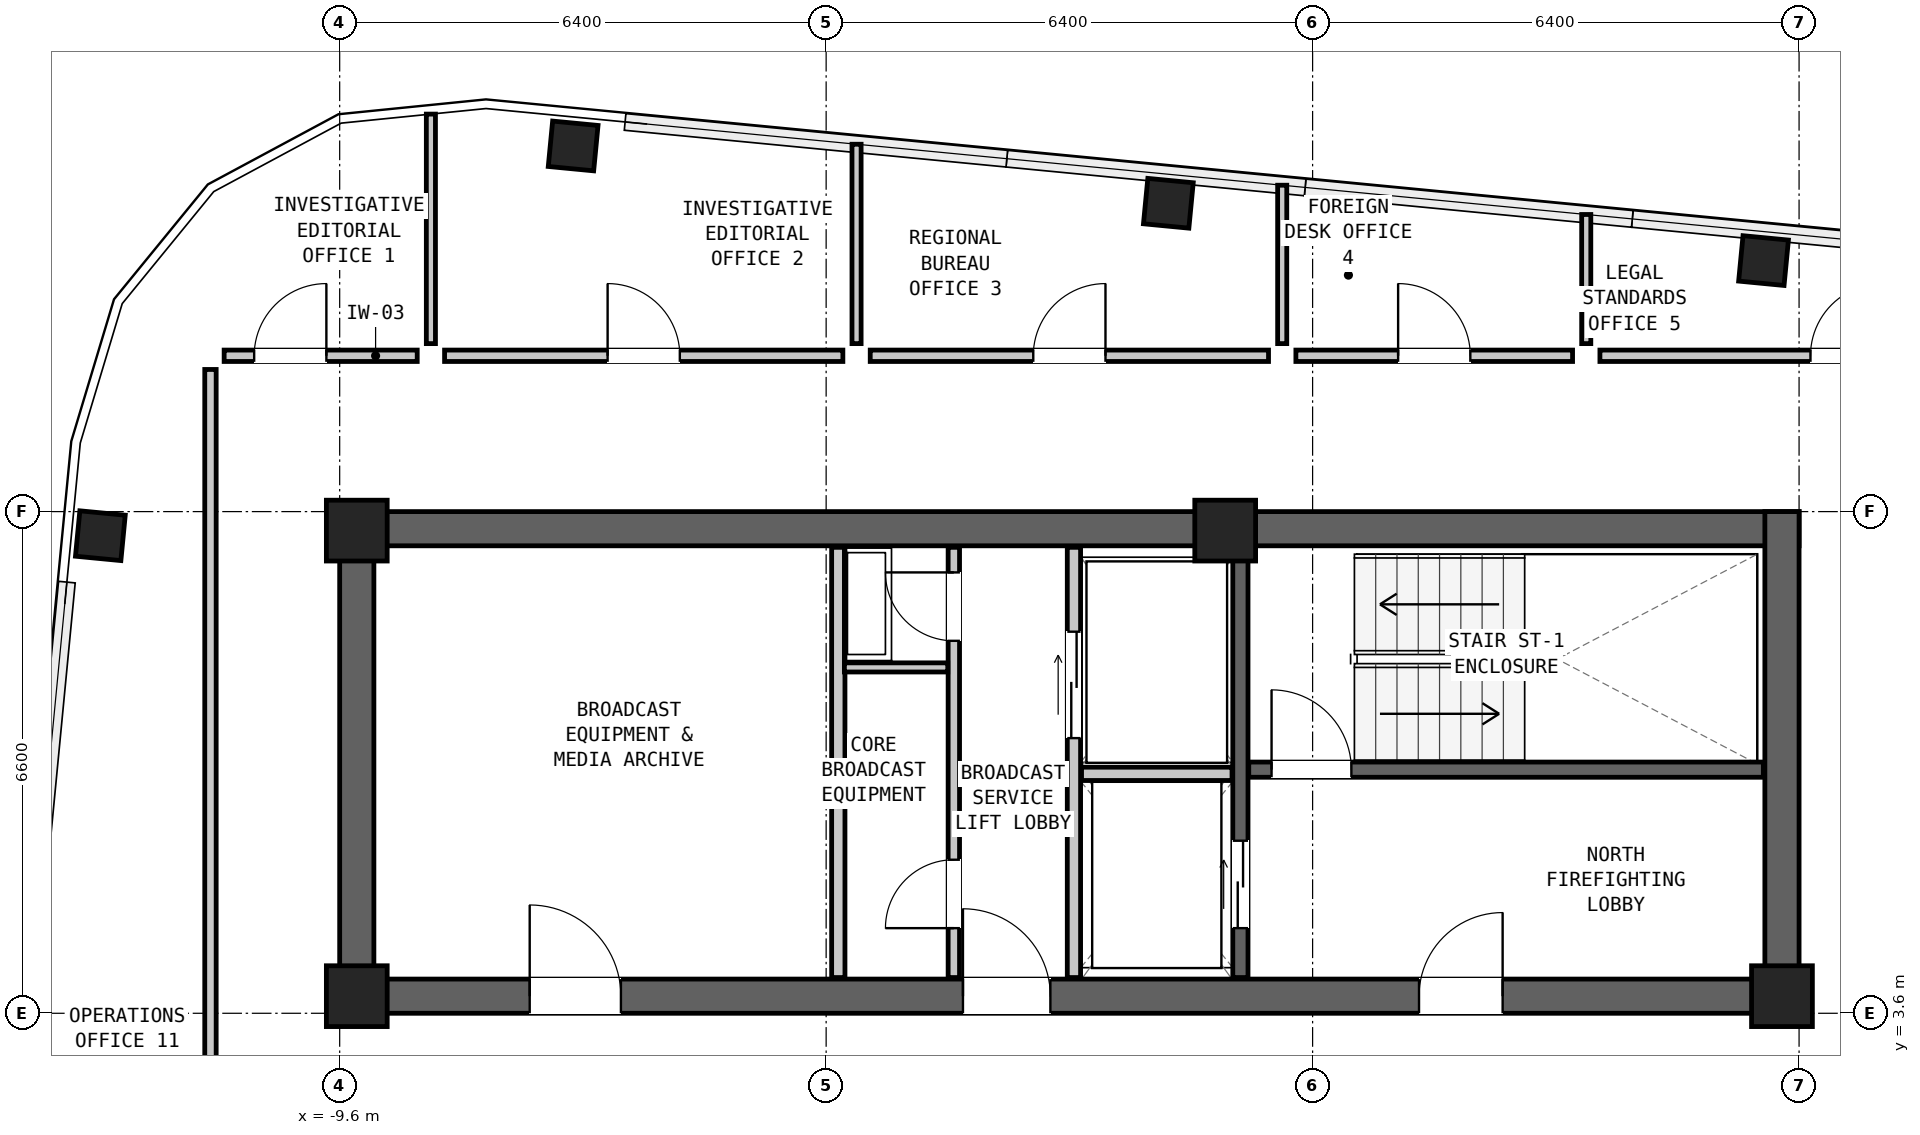
"""IFC4 building model, lengths in metres.
Left out: names, types, materials, properties, quantities, classifications, styles, units other than length and angle.
Written with IfcOpenShell. Run it as: python <this file> out.ifc"""

import sys

from ifc_helpers import new_model, si_unit, direction, frame, frame_2d, origin, origin_2d, place, context, subcontext, project, spatial, rectangle, hollow_rectangle, extrude, element, fill, save


model = new_model("IFC4")
c1 = context("Model", 3, precision=1e-05, world=origin(), true_north=direction((0.0, 1.0)))
c2 = subcontext(c1, "Body", "Model", "MODEL_VIEW")
j1 = project(units=[si_unit("LENGTHUNIT", "METRE"), si_unit("PLANEANGLEUNIT", "RADIAN")], contexts=[c1])
p1 = place(None, origin())
s1 = spatial("IfcSite", under=j1, at=p1, CompositionType="ELEMENT")
p2 = place(p1, origin())
s2 = spatial("IfcBuilding", under=s1, at=p2, CompositionType="ELEMENT")
p3 = place(p2, frame((0.0, 0.0, 252.0)))
s3 = spatial("IfcBuildingStorey", under=s2, at=p3, CompositionType="ELEMENT", Elevation=252.0)
p4 = place(p3, frame((-9.6, 9.975, 0.0), z_axis=(0.0, 0.0, 1.0), x_axis=(1.0, 0.0, 0.0)))
e1 = element("IfcWall", 1, at=p4, inside=s3, PredefinedType="SHEAR", context=c2, shape_type="SweptSolid", body=[
    extrude(rectangle(XDim=19.2, YDim=0.45, at=frame_2d((9.6, 0.0))), origin(), (0.0, 0.0, 1.0), 3.05),
])
p5 = place(p3, frame((-9.6, 3.825, 0.0), z_axis=(0.0, 0.0, 1.0), x_axis=(1.0, 0.0, 0.0)))
e2 = element("IfcWall", 2, at=p5, inside=s3, PredefinedType="SHEAR", context=c2, shape_type="SweptSolid", body=[
    extrude(rectangle(XDim=19.2, YDim=0.45, at=frame_2d((9.6, 0.0))), origin(), (0.0, 0.0, 1.0), 3.05),
])
p6 = place(p5, frame((14.2, 0.0, 0.0)))
e3 = element("IfcOpeningElement", 3, at=p6, cuts=e2, PredefinedType="OPENING", context=c2, shape_type="SweptSolid", body=[
    extrude(rectangle(XDim=1.1, YDim=2.08, at=frame_2d((0.55, 1.04))), frame((0.0, 0.237, 0.0), z_axis=(0.0, -1.0, 0.0), x_axis=(1.0, 0.0, 0.0)), (0.0, 0.0, 1.0), 0.474),
])
p7 = place(p5, frame((8.2, 0.0, 0.0)))
e4 = element("IfcOpeningElement", 4, at=p7, cuts=e2, PredefinedType="OPENING", context=c2, shape_type="SweptSolid", body=[
    extrude(rectangle(XDim=1.15, YDim=2.1, at=frame_2d((0.575, 1.05))), frame((0.0, 0.237, 0.0), z_axis=(0.0, -1.0, 0.0), x_axis=(1.0, 0.0, 0.0)), (0.0, 0.0, 1.0), 0.474),
])
p8 = place(p5, frame((2.5, 0.0, 0.0)))
e5 = element("IfcOpeningElement", 5, at=p8, cuts=e2, PredefinedType="OPENING", context=c2, shape_type="SweptSolid", body=[
    extrude(rectangle(XDim=1.2, YDim=2.1, at=frame_2d((0.6, 1.05))), frame((0.0, 0.237, 0.0), z_axis=(0.0, -1.0, 0.0), x_axis=(1.0, 0.0, 0.0)), (0.0, 0.0, 1.0), 0.474),
])
for number, where, z_axis, x_axis in (
    (6, (-9.375, 3.6, 0.0), (0.0, 0.0, 1.0), (0.0, 1.0, 0.0)),
    (7, (9.375, 3.6, 0.0), (0.0, 0.0, 1.0), (0.0, 1.0, 0.0)),
):
    element("IfcWall", number, at=place(p3, frame(where, z_axis=z_axis, x_axis=x_axis)), inside=s3, PredefinedType="SHEAR", context=c2, shape_type="SweptSolid", body=[
        extrude(rectangle(XDim=6.6, YDim=0.45, at=frame_2d((3.3, 0.0))), origin(), (0.0, 0.0, 1.0), 3.05),
    ])
for number, where, z_axis, x_axis in (
    (8, (9.133, 13.502, 0.0), (0.0, 0.0, 1.0), (0.995, -0.096, 0.0)),
    (9, (1.302, 14.256, 0.0), (0.0, 0.0, 1.0), (0.995, -0.096, 0.0)),
    (10, (-6.528, 15.01, 0.0), (0.0, 0.0, 1.0), (0.995, -0.096, 0.0)),
    (11, (-12.749, 9.883, 0.0), (0.0, 0.0, 1.0), (0.096, 0.995, 0.0)),
):
    element("IfcColumn", number, at=place(p3, frame(where, z_axis=z_axis, x_axis=x_axis)), inside=s3, PredefinedType="COLUMN", context=c2, shape_type="SweptSolid", body=[
        extrude(hollow_rectangle(XDim=0.6, YDim=0.6, WallThickness=0.04, at=origin_2d()), origin(), (0.0, 0.0, 1.0), 3.05),
    ])
for number, where, z_axis, x_axis in (
    (12, (-9.375, 9.95, 0.0), (0.0, 0.0, 1.0), (1.0, 0.0, 0.0)),
    (13, (2.05, 9.95, 0.0), (0.0, 0.0, 1.0), (1.0, 0.0, 0.0)),
    (14, (-9.375, 3.825, 0.0), (0.0, 0.0, 1.0), (1.0, 0.0, 0.0)),
    (15, (9.375, 3.825, 0.0), (0.0, 0.0, 1.0), (1.0, 0.0, 0.0)),
):
    element("IfcColumn", number, at=place(p3, frame(where, z_axis=z_axis, x_axis=x_axis)), inside=s3, PredefinedType="COLUMN", context=c2, shape_type="SweptSolid", body=[
        extrude(rectangle(XDim=0.8, YDim=0.8, at=origin_2d()), origin(), (0.0, 0.0, 1.0), 3.05),
    ])
p9 = place(p3, frame((2.36, 6.805, 0.0), z_axis=(0.0, 0.0, 1.0), x_axis=(1.0, 0.0, 0.0)))
e16 = element("IfcWall", 16, at=p9, inside=s3, PredefinedType="SHEAR", context=c2, shape_type="SweptSolid", body=[
    extrude(rectangle(XDim=6.77, YDim=0.2, at=frame_2d((3.385, 0.0))), origin(), (0.0, 0.0, 1.0), 2.86),
])
p10 = place(p9, frame((0.3, 0.0, 0.0)))
e17 = element("IfcOpeningElement", 17, at=p10, cuts=e16, PredefinedType="OPENING", context=c2, shape_type="SweptSolid", body=[
    extrude(rectangle(XDim=1.05, YDim=2.08, at=frame_2d((0.525, 1.04))), frame((0.0, 0.112, 0.0), z_axis=(0.0, -1.0, 0.0), x_axis=(1.0, 0.0, 0.0)), (0.0, 0.0, 1.0), 0.224),
])
p11 = place(p3, frame((2.25, 4.07, 0.0), z_axis=(0.0, 0.0, 1.0), x_axis=(0.0, 1.0, 0.0)))
e18 = element("IfcWall", 18, at=p11, inside=s3, PredefinedType="SHEAR", context=c2, shape_type="SweptSolid", body=[
    extrude(rectangle(XDim=5.66, YDim=0.2, at=frame_2d((2.83, 0.0))), origin(), (0.0, 0.0, 1.0), 2.86),
])
p12 = place(p11, frame((0.65, 0.0, 0.0)))
e19 = element("IfcOpeningElement", 19, at=p12, cuts=e18, PredefinedType="OPENING", context=c2, shape_type="SweptSolid", body=[
    extrude(rectangle(XDim=1.15, YDim=2.08, at=frame_2d((0.575, 1.04))), frame((0.0, 0.112, 0.0), z_axis=(0.0, -1.0, 0.0), x_axis=(1.0, 0.0, 0.0)), (0.0, 0.0, 1.0), 0.224),
])
p13 = place(p3, frame((0.06, 4.07, 0.0), z_axis=(0.0, 0.0, 1.0), x_axis=(0.0, 1.0, 0.0)))
e20 = element("IfcWall", 20, at=p13, inside=s3, PredefinedType="PARTITIONING", context=c2, shape_type="SweptSolid", body=[
    extrude(rectangle(XDim=5.66, YDim=0.175, at=frame_2d((2.83, 0.0))), origin(), (0.0, 0.0, 1.0), 2.86),
])
p14 = place(p13, frame((3.15, 0.0, 0.0)))
e21 = element("IfcOpeningElement", 21, at=p14, cuts=e20, PredefinedType="OPENING", context=c2, shape_type="SweptSolid", body=[
    extrude(rectangle(XDim=1.4, YDim=2.12, at=frame_2d((0.7, 1.06))), frame((0.0, 0.1, 0.0), z_axis=(0.0, -1.0, 0.0), x_axis=(1.0, 0.0, 0.0)), (0.0, 0.0, 1.0), 0.199),
])
p15 = place(p3, frame((0.16, 6.75, 0.0), z_axis=(0.0, 0.0, 1.0), x_axis=(1.0, 0.0, 0.0)))
e22 = element("IfcWall", 22, at=p15, inside=s3, PredefinedType="PARTITIONING", context=c2, shape_type="SweptSolid", body=[
    extrude(rectangle(XDim=1.98, YDim=0.175, at=frame_2d((0.99, 0.0))), origin(), (0.0, 0.0, 1.0), 2.86),
])
p16 = place(p3, frame((-3.04, 4.07, 0.0), z_axis=(0.0, 0.0, 1.0), x_axis=(0.0, 1.0, 0.0)))
e23 = element("IfcWall", 23, at=p16, inside=s3, PredefinedType="PARTITIONING", context=c2, shape_type="SweptSolid", body=[
    extrude(rectangle(XDim=5.66, YDim=0.175, at=frame_2d((2.83, 0.0))), origin(), (0.0, 0.0, 1.0), 2.86),
])
p17 = place(p3, frame((-1.52, 4.07, 0.0), z_axis=(0.0, 0.0, 1.0), x_axis=(0.0, 1.0, 0.0)))
e24 = element("IfcWall", 24, at=p17, inside=s3, PredefinedType="PARTITIONING", context=c2, shape_type="SweptSolid", body=[
    extrude(rectangle(XDim=5.66, YDim=0.15, at=frame_2d((2.83, 0.0))), origin(), (0.0, 0.0, 1.0), 2.86),
])
p18 = place(p17, frame((4.43, 0.0, 0.0)))
e25 = element("IfcOpeningElement", 25, at=p18, cuts=e24, PredefinedType="OPENING", context=c2, shape_type="SweptSolid", body=[
    extrude(rectangle(XDim=0.9, YDim=2.05, at=frame_2d((0.45, 1.025))), frame((0.0, 0.087, 0.0), z_axis=(0.0, -1.0, 0.0), x_axis=(1.0, 0.0, 0.0)), (0.0, 0.0, 1.0), 0.174),
])
p19 = place(p17, frame((0.65, 0.0, 0.0)))
e26 = element("IfcOpeningElement", 26, at=p19, cuts=e24, PredefinedType="OPENING", context=c2, shape_type="SweptSolid", body=[
    extrude(rectangle(XDim=0.9, YDim=2.05, at=frame_2d((0.45, 1.025))), frame((0.0, 0.087, 0.0), z_axis=(0.0, -1.0, 0.0), x_axis=(1.0, 0.0, 0.0)), (0.0, 0.0, 1.0), 0.174),
])
p20 = place(p3, frame((-2.96, 8.15, 0.0), z_axis=(0.0, 0.0, 1.0), x_axis=(1.0, 0.0, 0.0)))
e27 = element("IfcWall", 27, at=p20, inside=s3, PredefinedType="PARTITIONING", context=c2, shape_type="SweptSolid", body=[
    extrude(rectangle(XDim=1.36, YDim=0.12, at=frame_2d((0.68, 0.0))), origin(), (0.0, 0.0, 1.0), 2.86),
])
p21 = place(p3, frame((-8.4, 12.41, 0.0), z_axis=(0.0, 0.0, 1.0), x_axis=(0.0, 1.0, 0.0)))
e28 = element("IfcWall", 28, at=p21, inside=s3, PredefinedType="PARTITIONING", context=c2, shape_type="SweptSolid", body=[
    extrude(rectangle(XDim=3.02, YDim=0.12, at=frame_2d((1.51, 0.0))), origin(), (0.0, 0.0, 1.0), 2.86),
])
p22 = place(p3, frame((-2.8, 12.41, 0.0), z_axis=(0.0, 0.0, 1.0), x_axis=(0.0, 1.0, 0.0)))
e29 = element("IfcWall", 29, at=p22, inside=s3, PredefinedType="PARTITIONING", context=c2, shape_type="SweptSolid", body=[
    extrude(rectangle(XDim=2.623, YDim=0.12, at=frame_2d((1.312, 0.0))), origin(), (0.0, 0.0, 1.0), 2.381),
])
p23 = place(p3, frame((2.8, 12.41, 0.0), z_axis=(0.0, 0.0, 1.0), x_axis=(0.0, 1.0, 0.0)))
e30 = element("IfcWall", 30, at=p23, inside=s3, PredefinedType="PARTITIONING", context=c2, shape_type="SweptSolid", body=[
    extrude(rectangle(XDim=2.084, YDim=0.12, at=frame_2d((1.042, 0.0))), origin(), (0.0, 0.0, 1.0), 2.381),
])
p24 = place(p3, frame((6.8, 12.41, 0.0), z_axis=(0.0, 0.0, 1.0), x_axis=(0.0, 1.0, 0.0)))
e31 = element("IfcWall", 31, at=p24, inside=s3, PredefinedType="PARTITIONING", context=c2, shape_type="SweptSolid", body=[
    extrude(rectangle(XDim=1.699, YDim=0.12, at=frame_2d((0.85, 0.0))), origin(), (0.0, 0.0, 1.0), 2.86),
])
p25 = place(p3, frame((-11.12, 12.25, 0.0), z_axis=(0.0, 0.0, 1.0), x_axis=(1.0, 0.0, 0.0)))
e32 = element("IfcWall", 32, at=p25, inside=s3, PredefinedType="PARTITIONING", context=c2, shape_type="SweptSolid", body=[
    extrude(rectangle(XDim=2.54, YDim=0.15, at=frame_2d((1.27, 0.0))), origin(), (0.0, 0.0, 1.0), 2.86),
])
p26 = place(p25, frame((0.395, 0.0, 0.0)))
e33 = element("IfcOpeningElement", 33, at=p26, cuts=e32, PredefinedType="OPENING", context=c2, shape_type="SweptSolid", body=[
    extrude(rectangle(XDim=0.95, YDim=2.1, at=frame_2d((0.475, 1.05))), frame((0.0, 0.087, 0.0), z_axis=(0.0, -1.0, 0.0), x_axis=(1.0, 0.0, 0.0)), (0.0, 0.0, 1.0), 0.174),
])
p27 = place(p3, frame((-8.22, 12.25, 0.0), z_axis=(0.0, 0.0, 1.0), x_axis=(1.0, 0.0, 0.0)))
e34 = element("IfcWall", 34, at=p27, inside=s3, PredefinedType="PARTITIONING", context=c2, shape_type="SweptSolid", body=[
    extrude(rectangle(XDim=5.24, YDim=0.15, at=frame_2d((2.62, 0.0))), origin(), (0.0, 0.0, 1.0), 2.86),
])
p28 = place(p27, frame((2.145, 0.0, 0.0)))
e35 = element("IfcOpeningElement", 35, at=p28, cuts=e34, PredefinedType="OPENING", context=c2, shape_type="SweptSolid", body=[
    extrude(rectangle(XDim=0.95, YDim=2.1, at=frame_2d((0.475, 1.05))), frame((0.0, 0.087, 0.0), z_axis=(0.0, -1.0, 0.0), x_axis=(1.0, 0.0, 0.0)), (0.0, 0.0, 1.0), 0.174),
])
p29 = place(p3, frame((-2.62, 12.25, 0.0), z_axis=(0.0, 0.0, 1.0), x_axis=(1.0, 0.0, 0.0)))
e36 = element("IfcWall", 36, at=p29, inside=s3, PredefinedType="PARTITIONING", context=c2, shape_type="SweptSolid", body=[
    extrude(rectangle(XDim=5.24, YDim=0.15, at=frame_2d((2.62, 0.0))), origin(), (0.0, 0.0, 1.0), 2.86),
])
p30 = place(p29, frame((2.145, 0.0, 0.0)))
e37 = element("IfcOpeningElement", 37, at=p30, cuts=e36, PredefinedType="OPENING", context=c2, shape_type="SweptSolid", body=[
    extrude(rectangle(XDim=0.95, YDim=2.1, at=frame_2d((0.475, 1.05))), frame((0.0, 0.087, 0.0), z_axis=(0.0, -1.0, 0.0), x_axis=(1.0, 0.0, 0.0)), (0.0, 0.0, 1.0), 0.174),
])
p31 = place(p3, frame((2.98, 12.25, 0.0), z_axis=(0.0, 0.0, 1.0), x_axis=(1.0, 0.0, 0.0)))
e38 = element("IfcWall", 38, at=p31, inside=s3, PredefinedType="PARTITIONING", context=c2, shape_type="SweptSolid", body=[
    extrude(rectangle(XDim=3.64, YDim=0.15, at=frame_2d((1.82, 0.0))), origin(), (0.0, 0.0, 1.0), 2.86),
])
p32 = place(p31, frame((1.345, 0.0, 0.0)))
e39 = element("IfcOpeningElement", 39, at=p32, cuts=e38, PredefinedType="OPENING", context=c2, shape_type="SweptSolid", body=[
    extrude(rectangle(XDim=0.95, YDim=2.1, at=frame_2d((0.475, 1.05))), frame((0.0, 0.087, 0.0), z_axis=(0.0, -1.0, 0.0), x_axis=(1.0, 0.0, 0.0)), (0.0, 0.0, 1.0), 0.174),
])
p33 = place(p3, frame((6.98, 12.25, 0.0), z_axis=(0.0, 0.0, 1.0), x_axis=(1.0, 0.0, 0.0)))
e40 = element("IfcWall", 40, at=p33, inside=s3, PredefinedType="PARTITIONING", context=c2, shape_type="SweptSolid", body=[
    extrude(rectangle(XDim=4.49, YDim=0.15, at=frame_2d((2.245, 0.0))), origin(), (0.0, 0.0, 1.0), 2.86),
])
p34 = place(p33, frame((2.77, 0.0, 0.0)))
e41 = element("IfcOpeningElement", 41, at=p34, cuts=e40, PredefinedType="OPENING", context=c2, shape_type="SweptSolid", body=[
    extrude(rectangle(XDim=0.95, YDim=2.1, at=frame_2d((0.475, 1.05))), frame((0.0, 0.087, 0.0), z_axis=(0.0, -1.0, 0.0), x_axis=(1.0, 0.0, 0.0)), (0.0, 0.0, 1.0), 0.174),
])
p35 = place(p3, frame((-11.3, 12.07, 0.0), z_axis=(0.0, 0.0, 1.0), x_axis=(0.0, -1.0, 0.0)))
e42 = element("IfcWall", 42, at=p35, inside=s3, PredefinedType="PARTITIONING", context=c2, shape_type="SweptSolid", body=[
    extrude(rectangle(XDim=11.89, YDim=0.15, at=frame_2d((5.945, 0.0))), origin(), (0.0, 0.0, 1.0), 2.86),
])
p36 = place(p35, frame((9.75, 0.0, 0.0)))
e43 = element("IfcOpeningElement", 43, at=p36, cuts=e42, PredefinedType="OPENING", context=c2, shape_type="SweptSolid", body=[
    extrude(rectangle(XDim=0.95, YDim=2.1, at=frame_2d((0.475, 1.05))), frame((0.0, 0.087, 0.0), z_axis=(0.0, -1.0, 0.0), x_axis=(1.0, 0.0, 0.0)), (0.0, 0.0, 1.0), 0.174),
])
p37 = place(p10, origin())
e44 = element("IfcDoor", 44, at=p37, inside=s3, OperationType="SINGLE_SWING_LEFT", PredefinedType="DOOR", context=c2, shape_type="SweptSolid", body=[
    extrude(rectangle(XDim=1.05, YDim=2.08, at=frame_2d((0.525, 1.04))), frame((0.0, 0.025, 0.0), z_axis=(0.0, -1.0, 0.0), x_axis=(1.0, 0.0, 0.0)), (0.0, 0.0, 1.0), 0.05),
])
fill(e17, e44)
p38 = place(p6, origin())
e45 = element("IfcDoor", 45, at=p38, inside=s3, OperationType="SINGLE_SWING_RIGHT", PredefinedType="DOOR", context=c2, shape_type="SweptSolid", body=[
    extrude(rectangle(XDim=1.1, YDim=2.08, at=frame_2d((0.55, 1.04))), frame((0.0, 0.025, 0.0), z_axis=(0.0, -1.0, 0.0), x_axis=(1.0, 0.0, 0.0)), (0.0, 0.0, 1.0), 0.05),
])
fill(e3, e45)
p39 = place(p12, origin())
e46 = element("IfcDoor", 46, at=p39, inside=s3, OperationType="DOUBLE_DOOR_SLIDING", PredefinedType="DOOR", context=c2, shape_type="SweptSolid", body=[
    extrude(rectangle(XDim=1.15, YDim=2.08, at=frame_2d((0.575, 1.04))), frame((0.0, 0.025, 0.0), z_axis=(0.0, -1.0, 0.0), x_axis=(1.0, 0.0, 0.0)), (0.0, 0.0, 1.0), 0.05),
])
fill(e19, e46)
p40 = place(p14, origin())
e47 = element("IfcDoor", 47, at=p40, inside=s3, OperationType="DOUBLE_DOOR_SLIDING", PredefinedType="DOOR", context=c2, shape_type="SweptSolid", body=[
    extrude(rectangle(XDim=1.4, YDim=2.12, at=frame_2d((0.7, 1.06))), frame((0.0, 0.025, 0.0), z_axis=(0.0, -1.0, 0.0), x_axis=(1.0, 0.0, 0.0)), (0.0, 0.0, 1.0), 0.05),
])
fill(e21, e47)
p41 = place(p7, origin())
e48 = element("IfcDoor", 48, at=p41, inside=s3, OperationType="SINGLE_SWING_LEFT", PredefinedType="DOOR", context=c2, shape_type="SweptSolid", body=[
    extrude(rectangle(XDim=1.15, YDim=2.1, at=frame_2d((0.575, 1.05))), frame((0.0, 0.025, 0.0), z_axis=(0.0, -1.0, 0.0), x_axis=(1.0, 0.0, 0.0)), (0.0, 0.0, 1.0), 0.05),
])
fill(e4, e48)
p42 = place(p18, origin())
e49 = element("IfcDoor", 49, at=p42, inside=s3, OperationType="SINGLE_SWING_RIGHT", PredefinedType="DOOR", context=c2, shape_type="SweptSolid", body=[
    extrude(rectangle(XDim=0.9, YDim=2.05, at=frame_2d((0.45, 1.025))), frame((0.0, 0.025, 0.0), z_axis=(0.0, -1.0, 0.0), x_axis=(1.0, 0.0, 0.0)), (0.0, 0.0, 1.0), 0.05),
])
fill(e25, e49)
p43 = place(p19, origin())
e50 = element("IfcDoor", 50, at=p43, inside=s3, OperationType="SINGLE_SWING_LEFT", PredefinedType="DOOR", context=c2, shape_type="SweptSolid", body=[
    extrude(rectangle(XDim=0.9, YDim=2.05, at=frame_2d((0.45, 1.025))), frame((0.0, 0.025, 0.0), z_axis=(0.0, -1.0, 0.0), x_axis=(1.0, 0.0, 0.0)), (0.0, 0.0, 1.0), 0.05),
])
fill(e26, e50)
p44 = place(p8, origin())
e51 = element("IfcDoor", 51, at=p44, inside=s3, OperationType="SINGLE_SWING_LEFT", PredefinedType="DOOR", context=c2, shape_type="SweptSolid", body=[
    extrude(rectangle(XDim=1.2, YDim=2.1, at=frame_2d((0.6, 1.05))), frame((0.0, 0.025, 0.0), z_axis=(0.0, -1.0, 0.0), x_axis=(1.0, 0.0, 0.0)), (0.0, 0.0, 1.0), 0.05),
])
fill(e5, e51)
p45 = place(p26, origin())
e52 = element("IfcDoor", 52, at=p45, inside=s3, OperationType="SINGLE_SWING_RIGHT", PredefinedType="DOOR", context=c2, shape_type="SweptSolid", body=[
    extrude(rectangle(XDim=0.95, YDim=2.1, at=frame_2d((0.475, 1.05))), frame((0.0, 0.025, 0.0), z_axis=(0.0, -1.0, 0.0), x_axis=(1.0, 0.0, 0.0)), (0.0, 0.0, 1.0), 0.05),
])
fill(e33, e52)
p46 = place(p28, origin())
e53 = element("IfcDoor", 53, at=p46, inside=s3, OperationType="SINGLE_SWING_LEFT", PredefinedType="DOOR", context=c2, shape_type="SweptSolid", body=[
    extrude(rectangle(XDim=0.95, YDim=2.1, at=frame_2d((0.475, 1.05))), frame((0.0, 0.025, 0.0), z_axis=(0.0, -1.0, 0.0), x_axis=(1.0, 0.0, 0.0)), (0.0, 0.0, 1.0), 0.05),
])
fill(e35, e53)
p47 = place(p30, origin())
e54 = element("IfcDoor", 54, at=p47, inside=s3, OperationType="SINGLE_SWING_RIGHT", PredefinedType="DOOR", context=c2, shape_type="SweptSolid", body=[
    extrude(rectangle(XDim=0.95, YDim=2.1, at=frame_2d((0.475, 1.05))), frame((0.0, 0.025, 0.0), z_axis=(0.0, -1.0, 0.0), x_axis=(1.0, 0.0, 0.0)), (0.0, 0.0, 1.0), 0.05),
])
fill(e37, e54)
p48 = place(p32, origin())
e55 = element("IfcDoor", 55, at=p48, inside=s3, OperationType="SINGLE_SWING_LEFT", PredefinedType="DOOR", context=c2, shape_type="SweptSolid", body=[
    extrude(rectangle(XDim=0.95, YDim=2.1, at=frame_2d((0.475, 1.05))), frame((0.0, 0.025, 0.0), z_axis=(0.0, -1.0, 0.0), x_axis=(1.0, 0.0, 0.0)), (0.0, 0.0, 1.0), 0.05),
])
fill(e39, e55)
p49 = place(p34, origin())
e56 = element("IfcDoor", 56, at=p49, inside=s3, OperationType="SINGLE_SWING_RIGHT", PredefinedType="DOOR", context=c2, shape_type="SweptSolid", body=[
    extrude(rectangle(XDim=0.95, YDim=2.1, at=frame_2d((0.475, 1.05))), frame((0.0, 0.025, 0.0), z_axis=(0.0, -1.0, 0.0), x_axis=(1.0, 0.0, 0.0)), (0.0, 0.0, 1.0), 0.05),
])
fill(e41, e56)
save(model, sys.argv[1])
